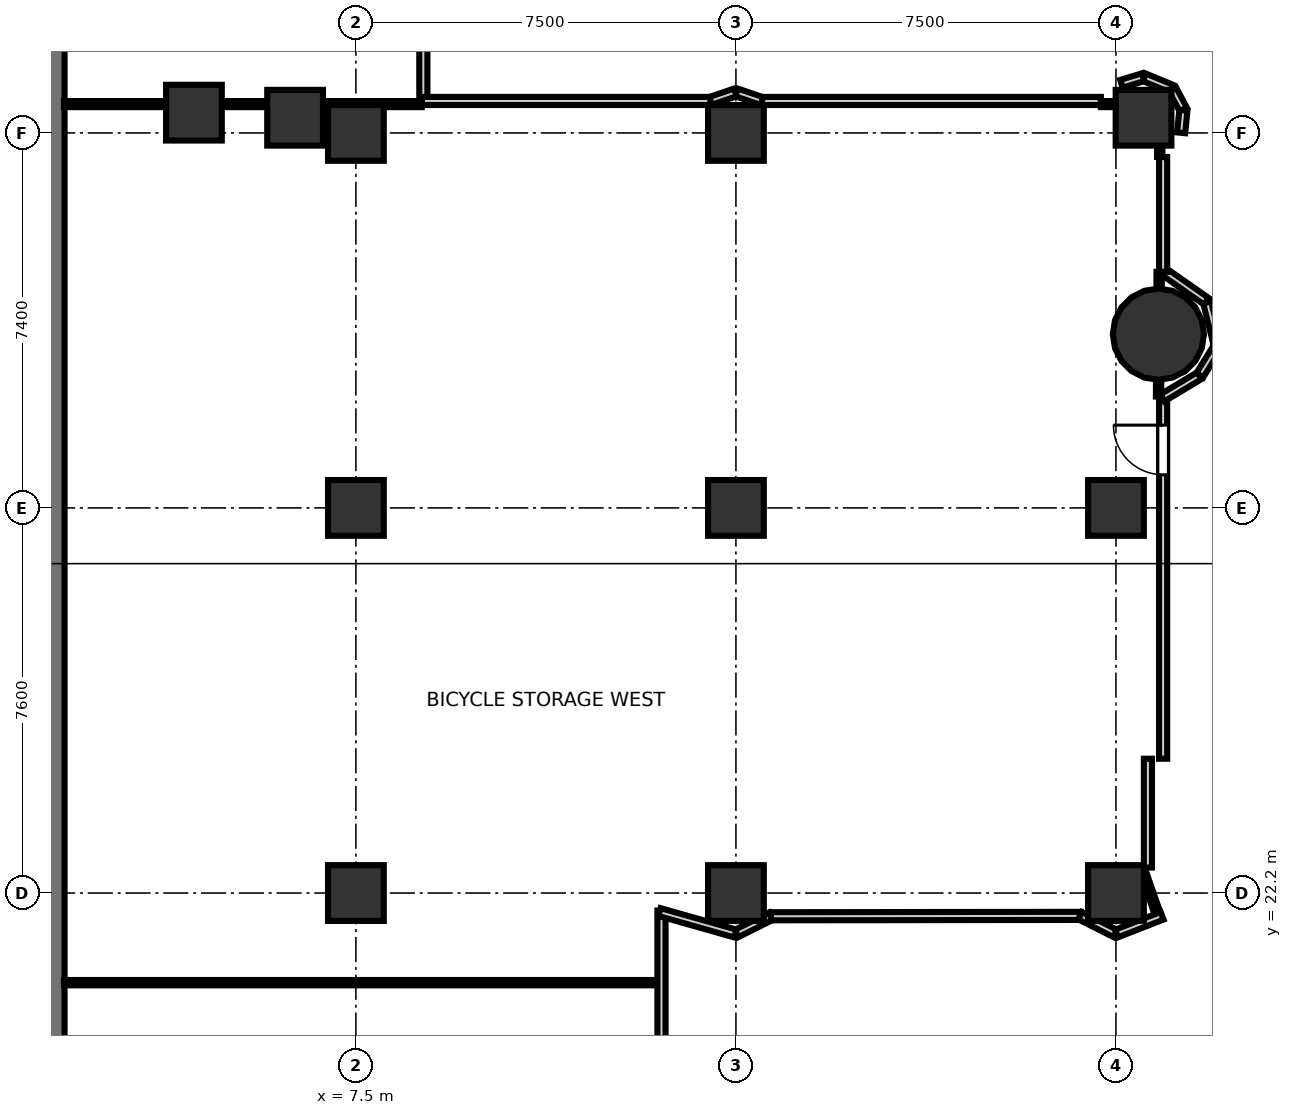
"""IFC4 building model, lengths in metres.
Left out: names, types, materials, properties, quantities, classifications, styles, units other than length and angle.
Written with IfcOpenShell. Run it as: python <this file> out.ifc"""

import sys

from ifc_helpers import new_model, si_unit, direction, frame, frame_2d, origin, origin_2d, place, context, subcontext, project, spatial, rectangle, hollow_circle, extrude, element, fill, save


model = new_model("IFC4")
c1 = context("Model", 3, precision=1e-05, world=origin(), true_north=direction((0.0, 1.0)))
c2 = subcontext(c1, "Body", "Model", "MODEL_VIEW")
j1 = project(units=[si_unit("LENGTHUNIT", "METRE"), si_unit("PLANEANGLEUNIT", "RADIAN")], contexts=[c1])
p1 = place(None, origin())
s1 = spatial("IfcSite", under=j1, at=p1, CompositionType="ELEMENT")
p2 = place(p1, origin())
s2 = spatial("IfcBuilding", under=s1, at=p2, CompositionType="ELEMENT")
p3 = place(p2, frame((0.0, 0.0, -10.0)))
s3 = spatial("IfcBuildingStorey", under=s2, at=p3, CompositionType="ELEMENT", Elevation=-10.0)
p4 = place(p3, frame((23.338, 33.228, 0.0), z_axis=(0.0, 0.0, 1.0), x_axis=(1.0, 0.0, 0.0)))
e1 = element("IfcColumn", 1, at=p4, inside=s3, PredefinedType="COLUMN", context=c2, shape_type="SweptSolid", body=[
    extrude(hollow_circle(Radius=0.9, WallThickness=0.045, at=origin_2d()), origin(), (0.0, 0.0, 1.0), 4.4),
])
for number, where, z_axis, x_axis in (
    (2, (6.3, 37.5, 0.0), (0.0, 0.0, 1.0), (1.0, 0.0, 0.0)),
    (3, (23.045, 37.5, 0.0), (0.0, 0.0, 1.0), (1.0, 0.0, 0.0)),
    (4, (7.5, 22.2, 0.0), (0.0, 0.0, 1.0), (1.0, 0.0, 0.0)),
    (5, (7.5, 29.8, 0.0), (0.0, 0.0, 1.0), (1.0, 0.0, 0.0)),
    (6, (7.5, 37.2, 0.0), (0.0, 0.0, 1.0), (1.0, 0.0, 0.0)),
    (7, (15.0, 22.2, 0.0), (0.0, 0.0, 1.0), (1.0, 0.0, 0.0)),
    (8, (15.0, 29.8, 0.0), (0.0, 0.0, 1.0), (1.0, 0.0, 0.0)),
    (9, (15.0, 37.2, 0.0), (0.0, 0.0, 1.0), (1.0, 0.0, 0.0)),
    (10, (22.5, 22.2, 0.0), (0.0, 0.0, 1.0), (1.0, 0.0, 0.0)),
    (11, (22.5, 29.8, 0.0), (0.0, 0.0, 1.0), (1.0, 0.0, 0.0)),
    (12, (4.303, 37.6, 0.0), (0.0, 0.0, 1.0), (1.0, 0.0, 0.0)),
):
    element("IfcColumn", number, at=place(p3, frame(where, z_axis=z_axis, x_axis=x_axis)), inside=s3, PredefinedType="COLUMN", context=c2, shape_type="SweptSolid", body=[
        extrude(rectangle(XDim=1.1, YDim=1.1, at=origin_2d()), origin(), (0.0, 0.0, 1.0), 4.4),
    ])
p5 = place(p3, frame((1.5, 46.5, 0.0), z_axis=(0.0, 0.0, 1.0), x_axis=(0.0, -1.0, 0.0)))
e13 = element("IfcWall", 13, at=p5, inside=s3, PredefinedType="SOLIDWALL", context=c2, shape_type="SweptSolid", body=[
    extrude(rectangle(XDim=41.0, YDim=0.5, at=frame_2d((20.5, 0.0))), origin(), (0.0, 0.0, 1.0), 4.0),
])
p6 = place(p3, frame((8.831, 37.8, 0.0), z_axis=(0.0, 0.0, 1.0), x_axis=(0.0, 1.0, 0.0)))
e14 = element("IfcWall", 14, at=p6, inside=s3, PredefinedType="PARTITIONING", context=c2, shape_type="SweptSolid", body=[
    extrude(rectangle(XDim=3.16, YDim=0.16, at=frame_2d((1.58, 0.0))), origin(), (0.0, 0.0, 1.0), 3.32),
])
p7 = place(p3, frame((13.531, 18.55, 0.0), z_axis=(0.0, 0.0, 1.0), x_axis=(0.0, 1.0, 0.0)))
e15 = element("IfcWall", 15, at=p7, inside=s3, PredefinedType="PARTITIONING", context=c2, shape_type="SweptSolid", body=[
    extrude(rectangle(XDim=3.304, YDim=0.16, at=frame_2d((1.652, 0.0))), origin(), (0.0, 0.0, 1.0), 3.32),
])
p8 = place(p3, frame((13.492, 21.824, 0.0), z_axis=(0.0, 0.0, 1.0), x_axis=(0.962241655343, -0.272196614093, 0.0)))
e16 = element("IfcWall", 16, at=p8, inside=s3, PredefinedType="PARTITIONING", context=c2, shape_type="SweptSolid", body=[
    extrude(rectangle(XDim=1.559, YDim=0.16, at=frame_2d((0.779, 0.0))), origin(), (0.0, 0.0, 1.0), 3.32),
])
p9 = place(p3, frame((15.014, 21.402, 0.0), z_axis=(0.0, 0.0, 1.0), x_axis=(0.895126158245, 0.44581292133, 0.0)))
e17 = element("IfcWall", 17, at=p9, inside=s3, PredefinedType="PARTITIONING", context=c2, shape_type="SweptSolid", body=[
    extrude(rectangle(XDim=0.767, YDim=0.16, at=frame_2d((0.384, 0.0))), origin(), (0.0, 0.0, 1.0), 3.32),
])
p10 = place(p3, frame((15.687, 21.741, 0.0), z_axis=(0.0, 0.0, 1.0), x_axis=(0.999999234634, 0.001237227661, 0.0)))
e18 = element("IfcWall", 18, at=p10, inside=s3, PredefinedType="PARTITIONING", context=c2, shape_type="SweptSolid", body=[
    extrude(rectangle(XDim=6.117, YDim=0.16, at=frame_2d((3.059, 0.0))), origin(), (0.0, 0.0, 1.0), 3.32),
])
p11 = place(p3, frame((21.79, 21.752, 0.0), z_axis=(0.0, 0.0, 1.0), x_axis=(0.893485033775, -0.449092968572, 0.0)))
e19 = element("IfcWall", 19, at=p11, inside=s3, PredefinedType="PARTITIONING", context=c2, shape_type="SweptSolid", body=[
    extrude(rectangle(XDim=0.779, YDim=0.16, at=frame_2d((0.39, 0.0))), origin(), (0.0, 0.0, 1.0), 3.32),
])
p12 = place(p3, frame((22.511, 21.401, 0.0), z_axis=(0.0, 0.0, 1.0), x_axis=(0.93195721425, 0.362568270547, 0.0)))
e20 = element("IfcWall", 20, at=p12, inside=s3, PredefinedType="PARTITIONING", context=c2, shape_type="SweptSolid", body=[
    extrude(rectangle(XDim=0.966, YDim=0.16, at=frame_2d((0.483, 0.0))), origin(), (0.0, 0.0, 1.0), 3.32),
])
p13 = place(p3, frame((23.131, 22.703, 0.0), z_axis=(0.0, 0.0, 1.0), x_axis=(0.0, 1.0, 0.0)))
e21 = element("IfcWall", 21, at=p13, inside=s3, PredefinedType="PARTITIONING", context=c2, shape_type="SweptSolid", body=[
    extrude(rectangle(XDim=2.147, YDim=0.16, at=frame_2d((1.073, 0.0))), origin(), (0.0, 0.0, 1.0), 3.32),
])
p14 = place(p3, frame((23.431, 24.85, 0.0), z_axis=(0.0, 0.0, 1.0), x_axis=(0.0, 1.0, 0.0)))
e22 = element("IfcWall", 22, at=p14, inside=s3, PredefinedType="PARTITIONING", context=c2, shape_type="SweptSolid", body=[
    extrude(rectangle(XDim=7.147, YDim=0.16, at=frame_2d((3.574, 0.0))), origin(), (0.0, 0.0, 1.0), 3.32),
])
p15 = place(p14, frame((5.604, 0.0, 0.0)))
e23 = element("IfcOpeningElement", 23, at=p15, cuts=e22, PredefinedType="OPENING", context=c2, shape_type="SweptSolid", body=[
    extrude(rectangle(XDim=0.98, YDim=2.1, at=frame_2d((0.49, 1.05))), frame((0.0, 0.09, 0.0), z_axis=(0.0, -1.0, 0.0), x_axis=(1.0, 0.0, 0.0)), (0.0, 0.0, 1.0), 0.18),
])
p16 = place(p3, frame((23.416, 31.971, 0.0), z_axis=(0.0, 0.0, 1.0), x_axis=(0.857113289669, 0.51512795369, 0.0)))
e24 = element("IfcWall", 24, at=p16, inside=s3, PredefinedType="PARTITIONING", context=c2, shape_type="SweptSolid", body=[
    extrude(rectangle(XDim=0.852, YDim=0.16, at=frame_2d((0.426, 0.0))), origin(), (0.0, 0.0, 1.0), 3.32),
])
p17 = place(p3, frame((24.156, 32.42, 0.0), z_axis=(0.0, 0.0, 1.0), x_axis=(0.527189094598, 0.849747997077, 0.0)))
e25 = element("IfcWall", 25, at=p17, inside=s3, PredefinedType="PARTITIONING", context=c2, shape_type="SweptSolid", body=[
    extrude(rectangle(XDim=0.665, YDim=0.16, at=frame_2d((0.332, 0.0))), origin(), (0.0, 0.0, 1.0), 3.32),
])
p18 = place(p3, frame((24.51, 33.008, 0.0), z_axis=(0.0, 0.0, 1.0), x_axis=(-0.241288371534, 0.970453461925, 0.0)))
e26 = element("IfcWall", 26, at=p18, inside=s3, PredefinedType="PARTITIONING", context=c2, shape_type="SweptSolid", body=[
    extrude(rectangle(XDim=0.875, YDim=0.16, at=frame_2d((0.438, 0.0))), origin(), (0.0, 0.0, 1.0), 3.32),
])
p19 = place(p3, frame((24.287, 33.875, 0.0), z_axis=(0.0, 0.0, 1.0), x_axis=(-0.819199496394, 0.573508661755, 0.0)))
e27 = element("IfcWall", 27, at=p19, inside=s3, PredefinedType="PARTITIONING", context=c2, shape_type="SweptSolid", body=[
    extrude(rectangle(XDim=1.061, YDim=0.16, at=frame_2d((0.531, 0.0))), origin(), (0.0, 0.0, 1.0), 3.32),
])
p20 = place(p3, frame((23.431, 34.459, 0.0), z_axis=(0.0, 0.0, 1.0), x_axis=(0.0, 1.0, 0.0)))
e28 = element("IfcWall", 28, at=p20, inside=s3, PredefinedType="PARTITIONING", context=c2, shape_type="SweptSolid", body=[
    extrude(rectangle(XDim=2.266, YDim=0.16, at=frame_2d((1.133, 0.0))), origin(), (0.0, 0.0, 1.0), 3.32),
])
for number, where, z_axis, x_axis in (
    (29, (23.787, 37.202, 0.0), (0.0, 0.0, 1.0), (0.098, 0.995, 0.0)),
    (30, (23.827, 37.665, 0.0), (0.0, 0.0, 1.0), (-0.471, 0.882, 0.0)),
):
    element("IfcWall", number, at=place(p3, frame(where, z_axis=z_axis, x_axis=x_axis)), inside=s3, PredefinedType="PARTITIONING", context=c2, shape_type="SweptSolid", body=[
        extrude(rectangle(XDim=0.447, YDim=0.16, at=frame_2d((0.224, 0.0))), origin(), (0.0, 0.0, 1.0), 3.32),
    ])
p21 = place(p3, frame((23.601, 38.073, 0.0), z_axis=(0.0, 0.0, 1.0), x_axis=(-0.923835035561, 0.382790839847, 0.0)))
e31 = element("IfcWall", 31, at=p21, inside=s3, PredefinedType="PARTITIONING", context=c2, shape_type="SweptSolid", body=[
    extrude(rectangle(XDim=0.589, YDim=0.16, at=frame_2d((0.295, 0.0))), origin(), (0.0, 0.0, 1.0), 3.32),
])
p22 = place(p3, frame((23.036, 38.3, 0.0), z_axis=(0.0, 0.0, 1.0), x_axis=(-0.956858887343, -0.290553041134, 0.0)))
e32 = element("IfcWall", 32, at=p22, inside=s3, PredefinedType="PARTITIONING", context=c2, shape_type="SweptSolid", body=[
    extrude(rectangle(XDim=0.447, YDim=0.16, at=frame_2d((0.224, 0.0))), origin(), (0.0, 0.0, 1.0), 3.32),
])
p23 = place(p3, frame((22.202, 37.831, 0.0), z_axis=(0.0, 0.0, 1.0), x_axis=(-1.0, 0.0, 0.0)))
e33 = element("IfcWall", 33, at=p23, inside=s3, PredefinedType="PARTITIONING", context=c2, shape_type="SweptSolid", body=[
    extrude(rectangle(XDim=6.699, YDim=0.16, at=frame_2d((3.35, 0.0))), origin(), (0.0, 0.0, 1.0), 3.32),
])
for number, where, z_axis, x_axis in (
    (34, (15.513, 37.829, 0.0), (0.0, 0.0, 1.0), (-0.947, 0.321, 0.0)),
    (35, (14.99, 38.0, 0.0), (0.0, 0.0, 1.0), (-0.947, -0.321, 0.0)),
):
    element("IfcWall", number, at=place(p3, frame(where, z_axis=z_axis, x_axis=x_axis)), inside=s3, PredefinedType="PARTITIONING", context=c2, shape_type="SweptSolid", body=[
        extrude(rectangle(XDim=0.531, YDim=0.16, at=frame_2d((0.266, 0.0))), origin(), (0.0, 0.0, 1.0), 3.32),
    ])
p24 = place(p3, frame((14.497, 37.831, 0.0), z_axis=(0.0, 0.0, 1.0), x_axis=(-1.0, 0.0, 0.0)))
e36 = element("IfcWall", 36, at=p24, inside=s3, PredefinedType="PARTITIONING", context=c2, shape_type="SweptSolid", body=[
    extrude(rectangle(XDim=5.697, YDim=0.16, at=frame_2d((2.848, 0.0))), origin(), (0.0, 0.0, 1.0), 3.32),
])
p25 = place(p3, frame((23.369, 37.8, 0.0), z_axis=(0.0, 0.0, 1.0), x_axis=(-0.004769421111, -0.999988626246, 0.0)))
e37 = element("IfcWall", 37, at=p25, inside=s3, PredefinedType="PARTITIONING", context=c2, shape_type="SweptSolid", body=[
    extrude(rectangle(XDim=1.075, YDim=0.105, at=frame_2d((0.538, 0.0))), origin(), (0.0, 0.0, 1.0), 3.32),
])
p26 = place(p3, frame((23.353, 34.459, 0.0), z_axis=(0.0, 0.0, 1.0), x_axis=(-0.00476090617, -0.999988666822, 0.0)))
e38 = element("IfcWall", 38, at=p26, inside=s3, PredefinedType="PARTITIONING", context=c2, shape_type="SweptSolid", body=[
    extrude(rectangle(XDim=2.461, YDim=0.105, at=frame_2d((1.231, 0.0))), origin(), (0.0, 0.0, 1.0), 3.32),
])
p27 = place(p3, frame((23.009, 22.687, 0.0), z_axis=(0.0, 0.0, 1.0), x_axis=(0.329991013701, -0.943984073423, 0.0)))
e39 = element("IfcWall", 39, at=p27, inside=s3, PredefinedType="PARTITIONING", context=c2, shape_type="SweptSolid", body=[
    extrude(rectangle(XDim=0.908, YDim=0.12, at=frame_2d((0.454, 0.0))), origin(), (0.0, 0.0, 1.0), 3.178),
])
p28 = place(p3, frame((13.438, 20.431, 0.0), z_axis=(0.0, 0.0, 1.0), x_axis=(-1.0, 0.0, 0.0)))
e40 = element("IfcWall", 40, at=p28, inside=s3, PredefinedType="PARTITIONING", context=c2, shape_type="SweptSolid", body=[
    extrude(rectangle(XDim=11.7, YDim=0.105, at=frame_2d((5.85, 0.0))), origin(), (0.0, 0.0, 1.0), 3.32),
])
p29 = place(p3, frame((1.738, 37.769, 0.0), z_axis=(0.0, 0.0, 1.0), x_axis=(1.0, 0.0, 0.0)))
e41 = element("IfcWall", 41, at=p29, inside=s3, PredefinedType="PARTITIONING", context=c2, shape_type="SweptSolid", body=[
    extrude(rectangle(XDim=7.062, YDim=0.12, at=frame_2d((3.531, 0.0))), origin(), (0.0, 0.0, 1.0), 3.32),
])
p30 = place(p3, frame((22.202, 37.769, 0.0), z_axis=(0.0, 0.0, 1.0), x_axis=(1.0, 0.0, 0.0)))
e42 = element("IfcWall", 42, at=p30, inside=s3, PredefinedType="PARTITIONING", context=c2, shape_type="SweptSolid", body=[
    extrude(rectangle(XDim=1.198, YDim=0.12, at=frame_2d((0.599, 0.0))), origin(), (0.0, 0.0, 1.0), 3.32),
])
p31 = place(p15, origin())
e43 = element("IfcDoor", 43, at=p31, inside=s3, OperationType="SINGLE_SWING_RIGHT", PredefinedType="DOOR", context=c2, shape_type="SweptSolid", body=[
    extrude(rectangle(XDim=0.98, YDim=2.1, at=frame_2d((0.49, 1.05))), frame((0.0, 0.025, 0.0), z_axis=(0.0, -1.0, 0.0), x_axis=(1.0, 0.0, 0.0)), (0.0, 0.0, 1.0), 0.05),
])
fill(e23, e43)
save(model, sys.argv[1])
